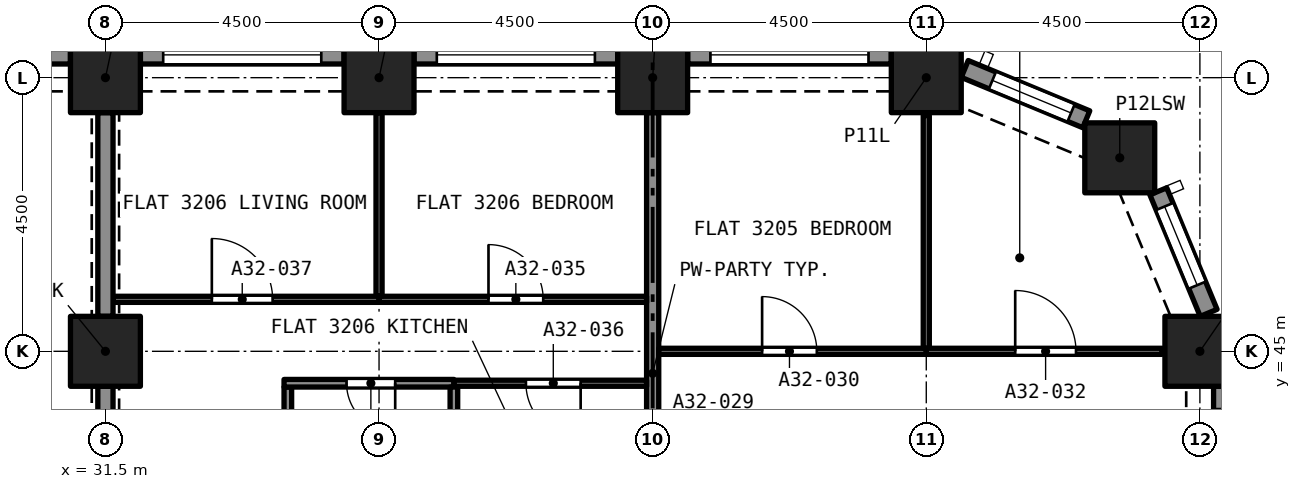
"""IFC4 building model, lengths in metres.
Left out: names, types, materials, properties, quantities, classifications, styles, units other than length and angle.
Written with IfcOpenShell. Run it as: python <this file> out.ifc"""

import sys

from ifc_helpers import new_model, si_unit, direction, frame, frame_2d, origin, origin_2d, place, context, subcontext, project, spatial, rectangle, extrude, element, fill, save


model = new_model("IFC4")
c1 = context("Model", 3, precision=1e-05, world=origin(), true_north=direction((0.0, 1.0)))
c2 = subcontext(c1, "Body", "Model", "MODEL_VIEW")
j1 = project(units=[si_unit("LENGTHUNIT", "METRE"), si_unit("PLANEANGLEUNIT", "RADIAN")], contexts=[c1])
p1 = place(None, origin())
s1 = spatial("IfcSite", under=j1, at=p1, CompositionType="ELEMENT")
p2 = place(p1, origin())
s2 = spatial("IfcBuilding", under=s1, at=p2, CompositionType="ELEMENT")
p3 = place(p2, frame((0.0, 0.0, 115.2)))
s3 = spatial("IfcBuildingStorey", under=s2, at=p3, CompositionType="ELEMENT", Elevation=115.2)
for number, where, z_axis, x_axis in (
    (1, (31.5, 45.0, 0.0), (0.0, 0.0, 1.0), (1.0, 0.0, 0.0)),
    (2, (49.5, 45.0, 0.0), (0.0, 0.0, 1.0), (1.0, 0.0, 0.0)),
    (3, (48.182, 48.182, 0.0), (0.0, 0.0, 1.0), (1.0, 0.0, 0.0)),
    (4, (31.5, 49.5, 0.0), (0.0, 0.0, 1.0), (1.0, 0.0, 0.0)),
    (5, (36.0, 49.5, 0.0), (0.0, 0.0, 1.0), (1.0, 0.0, 0.0)),
    (6, (40.5, 49.5, 0.0), (0.0, 0.0, 1.0), (1.0, 0.0, 0.0)),
    (7, (45.0, 49.5, 0.0), (0.0, 0.0, 1.0), (1.0, 0.0, 0.0)),
):
    element("IfcColumn", number, at=place(p3, frame(where, z_axis=z_axis, x_axis=x_axis)), inside=s3, PredefinedType="COLUMN", context=c2, shape_type="SweptSolid", body=[
        extrude(rectangle(XDim=1.15, YDim=1.15, at=origin_2d()), origin(), (0.0, 0.0, 1.0), 3.2),
    ])
p4 = place(p3, frame((49.875, 44.425, 0.0), z_axis=(0.0, 0.0, 1.0), x_axis=(0.0, -1.0, 0.0)))
e8 = element("IfcWall", 8, at=p4, inside=s3, PredefinedType="SOLIDWALL", context=c2, shape_type="SweptSolid", body=[
    extrude(rectangle(XDim=3.35, YDim=0.3, at=frame_2d((1.675, 0.0))), origin(), (0.0, 0.0, 1.0), 3.2),
])
p5 = place(p4, frame((0.375, 0.0, 0.45)))
e9 = element("IfcOpeningElement", 9, at=p5, cuts=e8, PredefinedType="OPENING", context=c2, shape_type="SweptSolid", body=[
    extrude(rectangle(XDim=2.6, YDim=1.95, at=frame_2d((1.3, 0.975))), frame((0.0, 0.16, 0.0), z_axis=(0.0, -1.0, 0.0), x_axis=(1.0, 0.0, 0.0)), (0.0, 0.0, 1.0), 0.32),
])
p6 = place(p3, frame((48.816, 47.631, 0.0), z_axis=(0.0, 0.0, 1.0), x_axis=(0.382723818695, -0.923862802911, 0.0)))
e10 = element("IfcWall", 10, at=p6, inside=s3, PredefinedType="SOLIDWALL", context=c2, shape_type="SweptSolid", body=[
    extrude(rectangle(XDim=2.164, YDim=0.3, at=frame_2d((1.082, 0.0))), origin(), (0.0, 0.0, 1.0), 3.2),
])
p7 = place(p6, frame((0.271, 0.0, 0.45)))
e11 = element("IfcOpeningElement", 11, at=p7, cuts=e10, PredefinedType="OPENING", context=c2, shape_type="SweptSolid", body=[
    extrude(rectangle(XDim=1.4, YDim=1.95, at=frame_2d((0.7, 0.975))), frame((0.0, 0.16, 0.0), z_axis=(0.0, -1.0, 0.0), x_axis=(1.0, 0.0, 0.0)), (0.0, 0.0, 1.0), 0.32),
])
p8 = place(p3, frame((45.632, 49.644, 0.0), z_axis=(0.0, 0.0, 1.0), x_axis=(0.923862802911, -0.382723818695, 0.0)))
e12 = element("IfcWall", 12, at=p8, inside=s3, PredefinedType="SOLIDWALL", context=c2, shape_type="SweptSolid", body=[
    extrude(rectangle(XDim=2.164, YDim=0.3, at=frame_2d((1.082, 0.0))), origin(), (0.0, 0.0, 1.0), 3.2),
])
p9 = place(p8, frame((0.493, 0.0, 0.45)))
e13 = element("IfcOpeningElement", 13, at=p9, cuts=e12, PredefinedType="OPENING", context=c2, shape_type="SweptSolid", body=[
    extrude(rectangle(XDim=1.4, YDim=1.95, at=frame_2d((0.7, 0.975))), frame((0.0, 0.16, 0.0), z_axis=(0.0, -1.0, 0.0), x_axis=(1.0, 0.0, 0.0)), (0.0, 0.0, 1.0), 0.32),
])
p10 = place(p3, frame((41.075, 49.875, 0.0), z_axis=(0.0, 0.0, 1.0), x_axis=(1.0, 0.0, 0.0)))
e14 = element("IfcWall", 14, at=p10, inside=s3, PredefinedType="SOLIDWALL", context=c2, shape_type="SweptSolid", body=[
    extrude(rectangle(XDim=3.35, YDim=0.3, at=frame_2d((1.675, 0.0))), origin(), (0.0, 0.0, 1.0), 3.2),
])
p11 = place(p10, frame((0.375, 0.0, 0.45)))
e15 = element("IfcOpeningElement", 15, at=p11, cuts=e14, PredefinedType="OPENING", context=c2, shape_type="SweptSolid", body=[
    extrude(rectangle(XDim=2.6, YDim=1.95, at=frame_2d((1.3, 0.975))), frame((0.0, 0.16, 0.0), z_axis=(0.0, -1.0, 0.0), x_axis=(1.0, 0.0, 0.0)), (0.0, 0.0, 1.0), 0.32),
])
p12 = place(p3, frame((36.575, 49.875, 0.0), z_axis=(0.0, 0.0, 1.0), x_axis=(1.0, 0.0, 0.0)))
e16 = element("IfcWall", 16, at=p12, inside=s3, PredefinedType="SOLIDWALL", context=c2, shape_type="SweptSolid", body=[
    extrude(rectangle(XDim=3.35, YDim=0.3, at=frame_2d((1.675, 0.0))), origin(), (0.0, 0.0, 1.0), 3.2),
])
p13 = place(p12, frame((0.375, 0.0, 0.45)))
e17 = element("IfcOpeningElement", 17, at=p13, cuts=e16, PredefinedType="OPENING", context=c2, shape_type="SweptSolid", body=[
    extrude(rectangle(XDim=2.6, YDim=1.95, at=frame_2d((1.3, 0.975))), frame((0.0, 0.16, 0.0), z_axis=(0.0, -1.0, 0.0), x_axis=(1.0, 0.0, 0.0)), (0.0, 0.0, 1.0), 0.32),
])
p14 = place(p3, frame((32.075, 49.875, 0.0), z_axis=(0.0, 0.0, 1.0), x_axis=(1.0, 0.0, 0.0)))
e18 = element("IfcWall", 18, at=p14, inside=s3, PredefinedType="SOLIDWALL", context=c2, shape_type="SweptSolid", body=[
    extrude(rectangle(XDim=3.35, YDim=0.3, at=frame_2d((1.675, 0.0))), origin(), (0.0, 0.0, 1.0), 3.2),
])
p15 = place(p14, frame((0.375, 0.0, 0.45)))
e19 = element("IfcOpeningElement", 19, at=p15, cuts=e18, PredefinedType="OPENING", context=c2, shape_type="SweptSolid", body=[
    extrude(rectangle(XDim=2.6, YDim=1.95, at=frame_2d((1.3, 0.975))), frame((0.0, 0.16, 0.0), z_axis=(0.0, -1.0, 0.0), x_axis=(1.0, 0.0, 0.0)), (0.0, 0.0, 1.0), 0.32),
])
p16 = place(p3, frame((27.575, 49.875, 0.0), z_axis=(0.0, 0.0, 1.0), x_axis=(1.0, 0.0, 0.0)))
e20 = element("IfcWall", 20, at=p16, inside=s3, PredefinedType="SOLIDWALL", context=c2, shape_type="SweptSolid", body=[
    extrude(rectangle(XDim=3.35, YDim=0.3, at=frame_2d((1.675, 0.0))), origin(), (0.0, 0.0, 1.0), 3.2),
])
p17 = place(p16, frame((0.375, 0.0, 0.45)))
e21 = element("IfcOpeningElement", 21, at=p17, cuts=e20, PredefinedType="OPENING", context=c2, shape_type="SweptSolid", body=[
    extrude(rectangle(XDim=2.6, YDim=1.95, at=frame_2d((1.3, 0.975))), frame((0.0, 0.16, 0.0), z_axis=(0.0, -1.0, 0.0), x_axis=(1.0, 0.0, 0.0)), (0.0, 0.0, 1.0), 0.32),
])
p18 = place(p3, frame((40.5, 40.35, 0.0), z_axis=(0.0, 0.0, 1.0), x_axis=(0.0, 1.0, 0.0)))
e22 = element("IfcWall", 22, at=p18, inside=s3, PredefinedType="PARTITIONING", context=c2, shape_type="SweptSolid", body=[
    extrude(rectangle(XDim=8.575, YDim=0.2, at=frame_2d((4.288, 0.0))), origin(), (0.0, 0.0, 1.0), 2.9),
])
p19 = place(p3, frame((40.6, 45.0, 0.0), z_axis=(0.0, 0.0, 1.0), x_axis=(1.0, 0.0, 0.0)))
e23 = element("IfcWall", 23, at=p19, inside=s3, PredefinedType="PARTITIONING", context=c2, shape_type="SweptSolid", body=[
    extrude(rectangle(XDim=4.4, YDim=0.1, at=frame_2d((2.2, 0.0))), origin(), (0.0, 0.0, 1.0), 2.9),
])
p20 = place(p19, frame((1.7, 0.0, 0.0)))
e24 = element("IfcOpeningElement", 24, at=p20, cuts=e23, PredefinedType="OPENING", context=c2, shape_type="SweptSolid", body=[
    extrude(rectangle(XDim=0.9, YDim=2.1, at=frame_2d((0.45, 1.05))), frame((0.0, 0.06, 0.0), z_axis=(0.0, -1.0, 0.0), x_axis=(1.0, 0.0, 0.0)), (0.0, 0.0, 1.0), 0.12),
])
p21 = place(p3, frame((45.0, 45.05, 0.0), z_axis=(0.0, 0.0, 1.0), x_axis=(0.0, 1.0, 0.0)))
e25 = element("IfcWall", 25, at=p21, inside=s3, PredefinedType="PARTITIONING", context=c2, shape_type="SweptSolid", body=[
    extrude(rectangle(XDim=3.828, YDim=0.1, at=frame_2d((1.914, 0.0))), origin(), (0.0, 0.0, 1.0), 2.9),
])
p22 = place(p3, frame((45.0, 45.0, 0.0), z_axis=(0.0, 0.0, 1.0), x_axis=(1.0, 0.0, 0.0)))
e26 = element("IfcWall", 26, at=p22, inside=s3, PredefinedType="PARTITIONING", context=c2, shape_type="SweptSolid", body=[
    extrude(rectangle(XDim=3.878, YDim=0.1, at=frame_2d((1.939, 0.0))), origin(), (0.0, 0.0, 1.0), 2.9),
])
p23 = place(p22, frame((1.462, 0.0, 0.0)))
e27 = element("IfcOpeningElement", 27, at=p23, cuts=e26, PredefinedType="OPENING", context=c2, shape_type="SweptSolid", body=[
    extrude(rectangle(XDim=1.0, YDim=2.1, at=frame_2d((0.5, 1.05))), frame((0.0, 0.06, 0.0), z_axis=(0.0, -1.0, 0.0), x_axis=(1.0, 0.0, 0.0)), (0.0, 0.0, 1.0), 0.12),
])
p24 = place(p3, frame((34.5, 40.425, 0.0), z_axis=(0.0, 0.0, 1.0), x_axis=(0.0, 1.0, 0.0)))
e28 = element("IfcWall", 28, at=p24, inside=s3, PredefinedType="PARTITIONING", context=c2, shape_type="SweptSolid", body=[
    extrude(rectangle(XDim=3.988, YDim=0.125, at=frame_2d((1.994, 0.0))), origin(), (0.0, 0.0, 1.0), 2.9),
])
p25 = place(p3, frame((37.231, 44.475, 0.0), z_axis=(0.0, 0.0, 1.0), x_axis=(-1.0, 0.0, 0.0)))
e29 = element("IfcWall", 29, at=p25, inside=s3, PredefinedType="PARTITIONING", context=c2, shape_type="SweptSolid", body=[
    extrude(rectangle(XDim=2.794, YDim=0.125, at=frame_2d((1.397, 0.0))), origin(), (0.0, 0.0, 1.0), 2.9),
])
p26 = place(p25, frame((0.966, 0.0, 0.0)))
e30 = element("IfcOpeningElement", 30, at=p26, cuts=e29, PredefinedType="OPENING", context=c2, shape_type="SweptSolid", body=[
    extrude(rectangle(XDim=0.8, YDim=2.1, at=frame_2d((0.4, 1.05))), frame((0.0, 0.073, 0.0), z_axis=(0.0, -1.0, 0.0), x_axis=(1.0, 0.0, 0.0)), (0.0, 0.0, 1.0), 0.145),
])
p27 = place(p3, frame((37.231, 40.35, 0.0), z_axis=(0.0, 0.0, 1.0), x_axis=(0.0, 1.0, 0.0)))
e31 = element("IfcWall", 31, at=p27, inside=s3, PredefinedType="PARTITIONING", context=c2, shape_type="SweptSolid", body=[
    extrude(rectangle(XDim=4.062, YDim=0.125, at=frame_2d((2.031, 0.0))), origin(), (0.0, 0.0, 1.0), 2.9),
])
p28 = place(p3, frame((36.0, 45.855, 0.0), z_axis=(0.0, 0.0, 1.0), x_axis=(1.0, 0.0, 0.0)))
e32 = element("IfcWall", 32, at=p28, inside=s3, PredefinedType="PARTITIONING", context=c2, shape_type="SweptSolid", body=[
    extrude(rectangle(XDim=4.4, YDim=0.1, at=frame_2d((2.2, 0.0))), origin(), (0.0, 0.0, 1.0), 2.9),
])
p29 = place(p28, frame((1.8, 0.0, 0.0)))
e33 = element("IfcOpeningElement", 33, at=p29, cuts=e32, PredefinedType="OPENING", context=c2, shape_type="SweptSolid", body=[
    extrude(rectangle(XDim=0.9, YDim=2.1, at=frame_2d((0.45, 1.05))), frame((0.0, 0.06, 0.0), z_axis=(0.0, -1.0, 0.0), x_axis=(1.0, 0.0, 0.0)), (0.0, 0.0, 1.0), 0.12),
])
p30 = place(p3, frame((36.0, 45.905, 0.0), z_axis=(0.0, 0.0, 1.0), x_axis=(0.0, 1.0, 0.0)))
e34 = element("IfcWall", 34, at=p30, inside=s3, PredefinedType="PARTITIONING", context=c2, shape_type="SweptSolid", body=[
    extrude(rectangle(XDim=3.02, YDim=0.1, at=frame_2d((1.51, 0.0))), origin(), (0.0, 0.0, 1.0), 2.9),
])
p31 = place(p3, frame((40.4, 44.475, 0.0), z_axis=(0.0, 0.0, 1.0), x_axis=(-1.0, 0.0, 0.0)))
e35 = element("IfcWall", 35, at=p31, inside=s3, PredefinedType="PARTITIONING", context=c2, shape_type="SweptSolid", body=[
    extrude(rectangle(XDim=3.168, YDim=0.1, at=frame_2d((1.584, 0.0))), origin(), (0.0, 0.0, 1.0), 2.9),
])
p32 = place(p31, frame((1.084, 0.0, 0.0)))
e36 = element("IfcOpeningElement", 36, at=p32, cuts=e35, PredefinedType="OPENING", context=c2, shape_type="SweptSolid", body=[
    extrude(rectangle(XDim=0.9, YDim=2.1, at=frame_2d((0.45, 1.05))), frame((0.0, 0.06, 0.0), z_axis=(0.0, -1.0, 0.0), x_axis=(1.0, 0.0, 0.0)), (0.0, 0.0, 1.0), 0.12),
])
p33 = place(p3, frame((31.625, 45.855, 0.0), z_axis=(0.0, 0.0, 1.0), x_axis=(1.0, 0.0, 0.0)))
e37 = element("IfcWall", 37, at=p33, inside=s3, PredefinedType="PARTITIONING", context=c2, shape_type="SweptSolid", body=[
    extrude(rectangle(XDim=4.375, YDim=0.1, at=frame_2d((2.188, 0.0))), origin(), (0.0, 0.0, 1.0), 2.9),
])
p34 = place(p33, frame((1.625, 0.0, 0.0)))
e38 = element("IfcOpeningElement", 38, at=p34, cuts=e37, PredefinedType="OPENING", context=c2, shape_type="SweptSolid", body=[
    extrude(rectangle(XDim=1.0, YDim=2.1, at=frame_2d((0.5, 1.05))), frame((0.0, 0.06, 0.0), z_axis=(0.0, -1.0, 0.0), x_axis=(1.0, 0.0, 0.0)), (0.0, 0.0, 1.0), 0.12),
])
for number, where, z_axis, x_axis in (
    (39, (31.5, 41.075, 0.0), (0.0, 0.0, 1.0), (0.0, 1.0, 0.0)),
    (40, (31.5, 45.575, 0.0), (0.0, 0.0, 1.0), (0.0, 1.0, 0.0)),
):
    element("IfcWall", number, at=place(p3, frame(where, z_axis=z_axis, x_axis=x_axis)), inside=s3, PredefinedType="PARTITIONING", context=c2, shape_type="SweptSolid", body=[
        extrude(rectangle(XDim=3.35, YDim=0.25, at=frame_2d((1.675, 0.0))), origin(), (0.0, 0.0, 1.0), 2.38),
    ])
p35 = place(p7, origin())
e41 = element("IfcWindow", 41, at=p35, inside=s3, PartitioningType="SINGLE_PANEL", PredefinedType="WINDOW", context=c2, shape_type="SweptSolid", body=[
    extrude(rectangle(XDim=1.4, YDim=1.95, at=frame_2d((0.7, 0.975))), frame((0.0, 0.03, 0.0), z_axis=(0.0, -1.0, 0.0), x_axis=(1.0, 0.0, 0.0)), (0.0, 0.0, 1.0), 0.06),
])
fill(e11, e41)
p36 = place(p9, origin())
e42 = element("IfcWindow", 42, at=p36, inside=s3, PartitioningType="SINGLE_PANEL", PredefinedType="WINDOW", context=c2, shape_type="SweptSolid", body=[
    extrude(rectangle(XDim=1.4, YDim=1.95, at=frame_2d((0.7, 0.975))), frame((0.0, 0.03, 0.0), z_axis=(0.0, -1.0, 0.0), x_axis=(1.0, 0.0, 0.0)), (0.0, 0.0, 1.0), 0.06),
])
fill(e13, e42)
p37 = place(p11, origin())
e43 = element("IfcWindow", 43, at=p37, inside=s3, PartitioningType="SINGLE_PANEL", PredefinedType="WINDOW", context=c2, shape_type="SweptSolid", body=[
    extrude(rectangle(XDim=2.6, YDim=1.95, at=frame_2d((1.3, 0.975))), frame((0.0, 0.03, 0.0), z_axis=(0.0, -1.0, 0.0), x_axis=(1.0, 0.0, 0.0)), (0.0, 0.0, 1.0), 0.06),
])
fill(e15, e43)
p38 = place(p13, origin())
e44 = element("IfcWindow", 44, at=p38, inside=s3, PartitioningType="SINGLE_PANEL", PredefinedType="WINDOW", context=c2, shape_type="SweptSolid", body=[
    extrude(rectangle(XDim=2.6, YDim=1.95, at=frame_2d((1.3, 0.975))), frame((0.0, 0.03, 0.0), z_axis=(0.0, -1.0, 0.0), x_axis=(1.0, 0.0, 0.0)), (0.0, 0.0, 1.0), 0.06),
])
fill(e17, e44)
p39 = place(p15, origin())
e45 = element("IfcWindow", 45, at=p39, inside=s3, PartitioningType="SINGLE_PANEL", PredefinedType="WINDOW", context=c2, shape_type="SweptSolid", body=[
    extrude(rectangle(XDim=2.6, YDim=1.95, at=frame_2d((1.3, 0.975))), frame((0.0, 0.03, 0.0), z_axis=(0.0, -1.0, 0.0), x_axis=(1.0, 0.0, 0.0)), (0.0, 0.0, 1.0), 0.06),
])
fill(e19, e45)
p40 = place(p20, origin())
e46 = element("IfcDoor", 46, at=p40, inside=s3, OperationType="SINGLE_SWING_LEFT", PredefinedType="DOOR", context=c2, shape_type="SweptSolid", body=[
    extrude(rectangle(XDim=0.9, YDim=2.1, at=frame_2d((0.45, 1.05))), frame((0.0, 0.025, 0.0), z_axis=(0.0, -1.0, 0.0), x_axis=(1.0, 0.0, 0.0)), (0.0, 0.0, 1.0), 0.05),
])
fill(e24, e46)
p41 = place(p23, origin())
e47 = element("IfcDoor", 47, at=p41, inside=s3, OperationType="SINGLE_SWING_RIGHT", PredefinedType="DOOR", context=c2, shape_type="SweptSolid", body=[
    extrude(rectangle(XDim=1.0, YDim=2.1, at=frame_2d((0.5, 1.05))), frame((0.0, 0.025, 0.0), z_axis=(0.0, -1.0, 0.0), x_axis=(1.0, 0.0, 0.0)), (0.0, 0.0, 1.0), 0.05),
])
fill(e27, e47)
p42 = place(p26, origin())
e48 = element("IfcDoor", 48, at=p42, inside=s3, OperationType="SINGLE_SWING_LEFT", PredefinedType="DOOR", context=c2, shape_type="SweptSolid", body=[
    extrude(rectangle(XDim=0.8, YDim=2.1, at=frame_2d((0.4, 1.05))), frame((0.0, 0.025, 0.0), z_axis=(0.0, -1.0, 0.0), x_axis=(1.0, 0.0, 0.0)), (0.0, 0.0, 1.0), 0.05),
])
fill(e30, e48)
p43 = place(p29, origin())
e49 = element("IfcDoor", 49, at=p43, inside=s3, OperationType="SINGLE_SWING_RIGHT", PredefinedType="DOOR", context=c2, shape_type="SweptSolid", body=[
    extrude(rectangle(XDim=0.9, YDim=2.1, at=frame_2d((0.45, 1.05))), frame((0.0, 0.025, 0.0), z_axis=(0.0, -1.0, 0.0), x_axis=(1.0, 0.0, 0.0)), (0.0, 0.0, 1.0), 0.05),
])
fill(e33, e49)
p44 = place(p32, origin())
e50 = element("IfcDoor", 50, at=p44, inside=s3, OperationType="SINGLE_SWING_LEFT", PredefinedType="DOOR", context=c2, shape_type="SweptSolid", body=[
    extrude(rectangle(XDim=0.9, YDim=2.1, at=frame_2d((0.45, 1.05))), frame((0.0, 0.025, 0.0), z_axis=(0.0, -1.0, 0.0), x_axis=(1.0, 0.0, 0.0)), (0.0, 0.0, 1.0), 0.05),
])
fill(e36, e50)
p45 = place(p34, origin())
e51 = element("IfcDoor", 51, at=p45, inside=s3, OperationType="SINGLE_SWING_LEFT", PredefinedType="DOOR", context=c2, shape_type="SweptSolid", body=[
    extrude(rectangle(XDim=1.0, YDim=2.1, at=frame_2d((0.5, 1.05))), frame((0.0, 0.025, 0.0), z_axis=(0.0, -1.0, 0.0), x_axis=(1.0, 0.0, 0.0)), (0.0, 0.0, 1.0), 0.05),
])
fill(e38, e51)
save(model, sys.argv[1])
